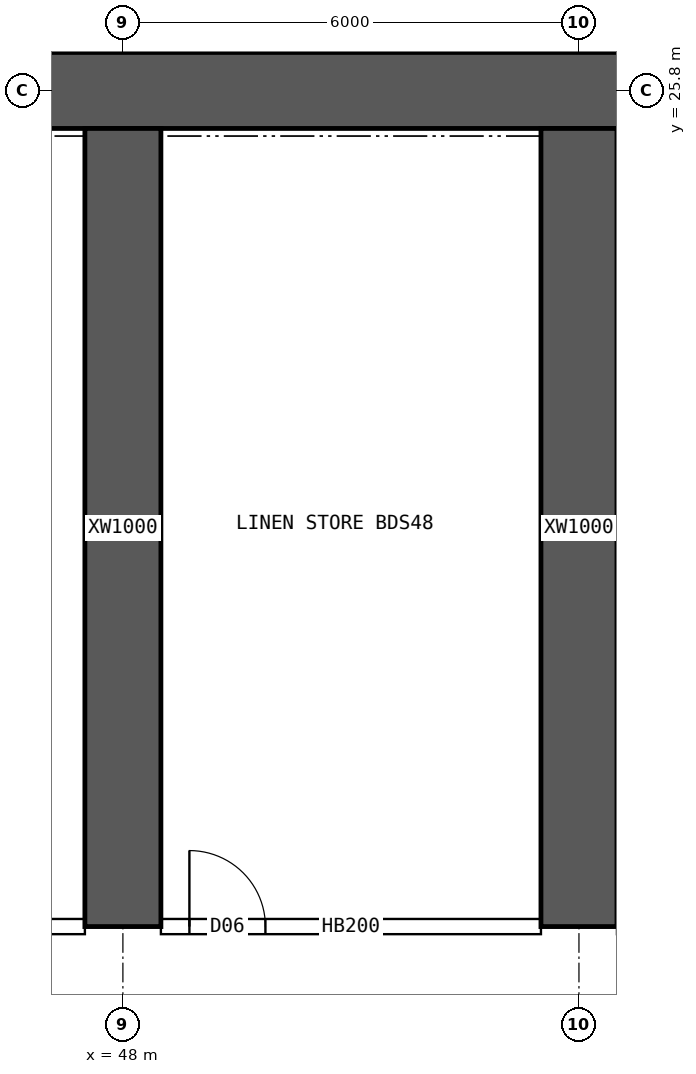
"""IFC4 building model, lengths in metres.
Left out: names, types, materials, properties, quantities, classifications, styles, units other than length and angle.
Written with IfcOpenShell. Run it as: python <this file> out.ifc"""

import sys

from ifc_helpers import new_model, si_unit, direction, frame, frame_2d, origin, place, context, subcontext, project, spatial, rectangle, extrude, element, fill, save


model = new_model("IFC4")
c1 = context("Model", 3, precision=1e-05, world=origin(), true_north=direction((0.0, 1.0)))
c2 = subcontext(c1, "Body", "Model", "MODEL_VIEW")
j1 = project(units=[si_unit("LENGTHUNIT", "METRE"), si_unit("PLANEANGLEUNIT", "RADIAN")], contexts=[c1])
p1 = place(None, origin())
s1 = spatial("IfcSite", under=j1, at=p1, CompositionType="ELEMENT")
p2 = place(p1, origin())
s2 = spatial("IfcBuilding", under=s1, at=p2, CompositionType="ELEMENT")
p3 = place(p2, frame((0.0, 0.0, 27.7)))
s3 = spatial("IfcBuildingStorey", under=s2, at=p3, CompositionType="ELEMENT", Elevation=27.7)
p4 = place(p3, frame((18.0, 25.8, 0.0), z_axis=(0.0, 0.0, 1.0), x_axis=(1.0, 0.0, 0.0)))
e1 = element("IfcWall", 1, at=p4, inside=s3, PredefinedType="SHEAR", context=c2, shape_type="SweptSolid", body=[
    extrude(rectangle(XDim=48.0, YDim=1.0, at=frame_2d((24.0, 0.0))), origin(), (0.0, 0.0, 1.0), 3.75),
])
for number, where, z_axis, x_axis in (
    (2, (48.0, 14.8, 0.0), (0.0, 0.0, 1.0), (0.0, 1.0, 0.0)),
    (3, (54.0, 14.8, 0.0), (0.0, 0.0, 1.0), (0.0, 1.0, 0.0)),
):
    element("IfcWall", number, at=place(p3, frame(where, z_axis=z_axis, x_axis=x_axis)), inside=s3, PredefinedType="SHEAR", context=c2, shape_type="SweptSolid", body=[
        extrude(rectangle(XDim=10.5, YDim=1.0, at=frame_2d((5.25, 0.0))), origin(), (0.0, 0.0, 1.0), 3.75),
    ])
p5 = place(p3, frame((42.5, 14.8, 0.0), z_axis=(0.0, 0.0, 1.0), x_axis=(1.0, 0.0, 0.0)))
e4 = element("IfcWall", 4, at=p5, inside=s3, PredefinedType="SOLIDWALL", context=c2, shape_type="SweptSolid", body=[
    extrude(rectangle(XDim=5.0, YDim=0.2, at=frame_2d((2.5, 0.0))), origin(), (0.0, 0.0, 1.0), 3.5),
])
p6 = place(p5, frame((0.35, 0.0, 0.0)))
e5 = element("IfcOpeningElement", 5, at=p6, cuts=e4, PredefinedType="OPENING", context=c2, shape_type="SweptSolid", body=[
    extrude(rectangle(XDim=0.9, YDim=2.1, at=frame_2d((0.45, 1.05))), frame((0.0, 0.11, 0.0), z_axis=(0.0, -1.0, 0.0), x_axis=(1.0, 0.0, 0.0)), (0.0, 0.0, 1.0), 0.22),
])
p7 = place(p5, frame((2.525, 0.0, 0.0)))
e6 = element("IfcOpeningElement", 6, at=p7, cuts=e4, PredefinedType="OPENING", context=c2, shape_type="SweptSolid", body=[
    extrude(rectangle(XDim=0.9, YDim=2.1, at=frame_2d((0.45, 1.05))), frame((0.0, 0.11, 0.0), z_axis=(0.0, -1.0, 0.0), x_axis=(1.0, 0.0, 0.0)), (0.0, 0.0, 1.0), 0.22),
])
p8 = place(p3, frame((48.5, 14.8, 0.0), z_axis=(0.0, 0.0, 1.0), x_axis=(1.0, 0.0, 0.0)))
e7 = element("IfcWall", 7, at=p8, inside=s3, PredefinedType="SOLIDWALL", context=c2, shape_type="SweptSolid", body=[
    extrude(rectangle(XDim=5.0, YDim=0.2, at=frame_2d((2.5, 0.0))), origin(), (0.0, 0.0, 1.0), 3.5),
])
p9 = place(p8, frame((0.375, 0.0, 0.0)))
e8 = element("IfcOpeningElement", 8, at=p9, cuts=e7, PredefinedType="OPENING", context=c2, shape_type="SweptSolid", body=[
    extrude(rectangle(XDim=1.0, YDim=2.1, at=frame_2d((0.5, 1.05))), frame((0.0, 0.11, 0.0), z_axis=(0.0, -1.0, 0.0), x_axis=(1.0, 0.0, 0.0)), (0.0, 0.0, 1.0), 0.22),
])
p10 = place(p9, origin())
e9 = element("IfcDoor", 9, at=p10, inside=s3, OperationType="SINGLE_SWING_LEFT", PredefinedType="DOOR", context=c2, shape_type="SweptSolid", body=[
    extrude(rectangle(XDim=1.0, YDim=2.1, at=frame_2d((0.5, 1.05))), frame((0.0, 0.025, 0.0), z_axis=(0.0, -1.0, 0.0), x_axis=(1.0, 0.0, 0.0)), (0.0, 0.0, 1.0), 0.05),
])
fill(e8, e9)
save(model, sys.argv[1])
